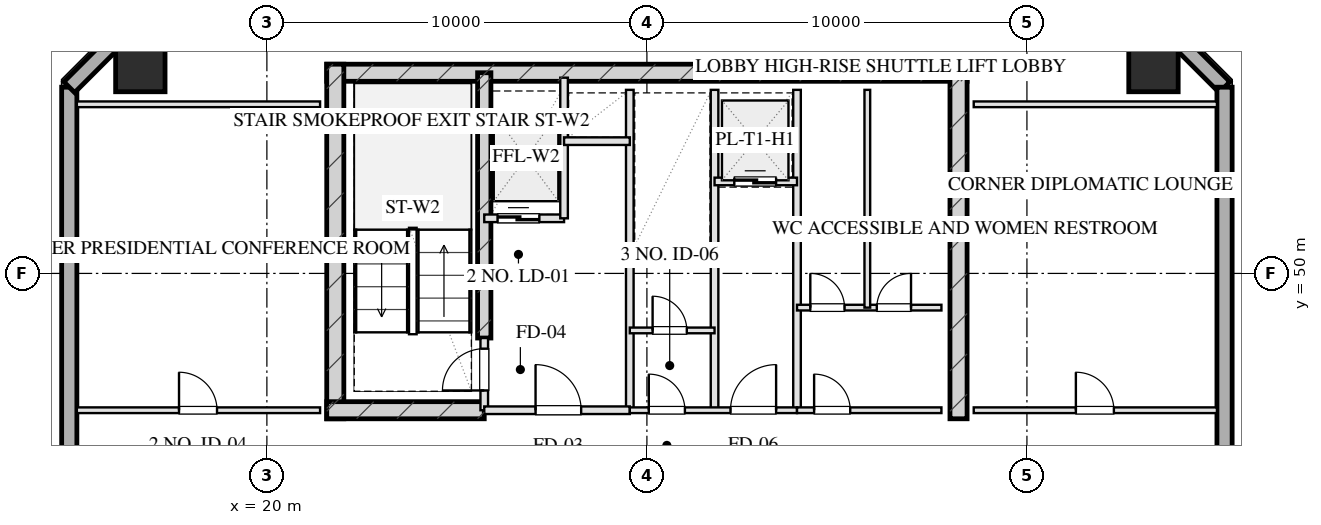
"""IFC4 building model, lengths in metres.
Left out: names, types, materials, properties, quantities, classifications, styles, units other than length and angle.
Written with IfcOpenShell. Run it as: python <this file> out.ifc"""

import sys

from ifc_helpers import new_model, si_unit, direction, frame, frame_2d, origin, origin_2d, place, context, subcontext, project, spatial, rectangle, hollow_rectangle, extrude, element, fill, save


model = new_model("IFC4")
c1 = context("Model", 3, precision=1e-05, world=origin(), true_north=direction((0.0, 1.0)))
c2 = subcontext(c1, "Body", "Model", "MODEL_VIEW")
j1 = project(units=[si_unit("LENGTHUNIT", "METRE"), si_unit("PLANEANGLEUNIT", "RADIAN")], contexts=[c1])
p1 = place(None, origin())
s1 = spatial("IfcSite", under=j1, at=p1, CompositionType="ELEMENT")
p2 = place(p1, origin())
s2 = spatial("IfcBuilding", under=s1, at=p2, CompositionType="ELEMENT")
p3 = place(p2, frame((0.0, 0.0, 234.4)))
s3 = spatial("IfcBuildingStorey", under=s2, at=p3, CompositionType="ELEMENT", Elevation=234.4)
p4 = place(p3, frame((21.575, 55.28, 0.0), z_axis=(0.0, 0.0, 1.0), x_axis=(1.0, 0.0, 0.0)))
e1 = element("IfcWall", 1, at=p4, inside=s3, PredefinedType="SHEAR", context=c2, shape_type="SweptSolid", body=[
    extrude(rectangle(XDim=16.85, YDim=0.45, at=frame_2d((8.425, 0.0))), origin(), (0.0, 0.0, 1.0), 3.2),
])
for number, where, z_axis, x_axis in (
    (2, (21.8, 46.175, 0.0), (0.0, 0.0, 1.0), (0.0, 1.0, 0.0)),
    (3, (38.2, 46.175, 0.0), (0.0, 0.0, 1.0), (0.0, 1.0, 0.0)),
):
    element("IfcWall", number, at=place(p3, frame(where, z_axis=z_axis, x_axis=x_axis)), inside=s3, PredefinedType="SHEAR", context=c2, shape_type="SweptSolid", body=[
        extrude(rectangle(XDim=9.33, YDim=0.45, at=frame_2d((4.665, 0.0))), origin(), (0.0, 0.0, 1.0), 3.2),
    ])
p5 = place(p3, frame((25.72, 48.3, 0.0), z_axis=(0.0, 0.0, 1.0), x_axis=(0.0, 1.0, 0.0)))
e4 = element("IfcWall", 4, at=p5, inside=s3, PredefinedType="SHEAR", context=c2, shape_type="SweptSolid", body=[
    extrude(rectangle(XDim=6.98, YDim=0.35, at=frame_2d((3.49, 0.0))), origin(), (0.0, 0.0, 1.0), 3.2),
])
p6 = place(p3, frame((21.575, 46.4, 0.0), z_axis=(0.0, 0.0, 1.0), x_axis=(1.0, 0.0, 0.0)))
e5 = element("IfcWall", 5, at=p6, inside=s3, PredefinedType="SHEAR", context=c2, shape_type="SweptSolid", body=[
    extrude(rectangle(XDim=4.145, YDim=0.45, at=frame_2d((2.073, 0.0))), origin(), (0.0, 0.0, 1.0), 3.2),
])
for number, where, z_axis, x_axis in (
    (6, (43.33, 55.43, 0.0), (0.0, 0.0, 1.0), (1.0, 0.0, 0.0)),
    (7, (16.67, 55.43, 0.0), (0.0, 0.0, 1.0), (1.0, 0.0, 0.0)),
):
    element("IfcColumn", number, at=place(p3, frame(where, z_axis=z_axis, x_axis=x_axis)), inside=s3, PredefinedType="COLUMN", context=c2, shape_type="SweptSolid", body=[
        extrude(hollow_rectangle(XDim=1.3, YDim=1.3, WallThickness=0.045, at=origin_2d()), origin(), (0.0, 0.0, 1.0), 3.201),
    ])
p7 = place(p3, frame((14.8, 13.1, 0.0), z_axis=(0.0, 0.0, 1.0), x_axis=(0.0, 1.0, 0.0)))
e8 = element("IfcWall", 8, at=p7, inside=s3, PredefinedType="SOLIDWALL", context=c2, shape_type="SweptSolid", body=[
    extrude(rectangle(XDim=41.8, YDim=0.4, at=frame_2d((20.9, 0.0))), origin(), (0.0, 0.0, 1.0), 2.36),
])
p8 = place(p7, frame((13.525, 0.0, 0.75)))
e9 = element("IfcOpeningElement", 9, at=p8, cuts=e8, PredefinedType="OPENING", context=c2, shape_type="SweptSolid", body=[
    extrude(rectangle(XDim=1.95, YDim=1.21, at=frame_2d((0.975, 0.605))), frame((0.0, 0.21, 0.0), z_axis=(0.0, -1.0, 0.0), x_axis=(1.0, 0.0, 0.0)), (0.0, 0.0, 1.0), 0.42),
])
p9 = place(p7, frame((17.325, 0.0, 0.75)))
e10 = element("IfcOpeningElement", 10, at=p9, cuts=e8, PredefinedType="OPENING", context=c2, shape_type="SweptSolid", body=[
    extrude(rectangle(XDim=1.95, YDim=1.21, at=frame_2d((0.975, 0.605))), frame((0.0, 0.21, 0.0), z_axis=(0.0, -1.0, 0.0), x_axis=(1.0, 0.0, 0.0)), (0.0, 0.0, 1.0), 0.42),
])
p10 = place(p7, frame((22.525, 0.0, 0.75)))
e11 = element("IfcOpeningElement", 11, at=p10, cuts=e8, PredefinedType="OPENING", context=c2, shape_type="SweptSolid", body=[
    extrude(rectangle(XDim=1.95, YDim=1.21, at=frame_2d((0.975, 0.605))), frame((0.0, 0.21, 0.0), z_axis=(0.0, -1.0, 0.0), x_axis=(1.0, 0.0, 0.0)), (0.0, 0.0, 1.0), 0.42),
])
p11 = place(p7, frame((26.325, 0.0, 0.75)))
e12 = element("IfcOpeningElement", 12, at=p11, cuts=e8, PredefinedType="OPENING", context=c2, shape_type="SweptSolid", body=[
    extrude(rectangle(XDim=1.95, YDim=1.21, at=frame_2d((0.975, 0.605))), frame((0.0, 0.21, 0.0), z_axis=(0.0, -1.0, 0.0), x_axis=(1.0, 0.0, 0.0)), (0.0, 0.0, 1.0), 0.42),
])
for number, where, z_axis, x_axis in (
    (13, (14.8, 54.9, 0.0), (0.0, 0.0, 1.0), (0.707, 0.707, 0.0)),
    (14, (42.8, 57.3, 0.0), (0.0, 0.0, 1.0), (0.707, -0.707, 0.0)),
):
    element("IfcWall", number, at=place(p3, frame(where, z_axis=z_axis, x_axis=x_axis)), inside=s3, PredefinedType="SOLIDWALL", context=c2, shape_type="SweptSolid", body=[
        extrude(rectangle(XDim=3.394, YDim=0.4, at=frame_2d((1.697, 0.0))), origin(), (0.0, 0.0, 1.0), 2.36),
    ])
p12 = place(p3, frame((45.2, 54.9, 0.0), z_axis=(0.0, 0.0, 1.0), x_axis=(0.0, -1.0, 0.0)))
e15 = element("IfcWall", 15, at=p12, inside=s3, PredefinedType="SOLIDWALL", context=c2, shape_type="SweptSolid", body=[
    extrude(rectangle(XDim=41.8, YDim=0.4, at=frame_2d((20.9, 0.0))), origin(), (0.0, 0.0, 1.0), 2.36),
])
p13 = place(p12, frame((26.325, 0.0, 0.75)))
e16 = element("IfcOpeningElement", 16, at=p13, cuts=e15, PredefinedType="OPENING", context=c2, shape_type="SweptSolid", body=[
    extrude(rectangle(XDim=1.95, YDim=1.21, at=frame_2d((0.975, 0.605))), frame((0.0, 0.21, 0.0), z_axis=(0.0, -1.0, 0.0), x_axis=(1.0, 0.0, 0.0)), (0.0, 0.0, 1.0), 0.42),
])
p14 = place(p12, frame((22.525, 0.0, 0.75)))
e17 = element("IfcOpeningElement", 17, at=p14, cuts=e15, PredefinedType="OPENING", context=c2, shape_type="SweptSolid", body=[
    extrude(rectangle(XDim=1.95, YDim=1.21, at=frame_2d((0.975, 0.605))), frame((0.0, 0.21, 0.0), z_axis=(0.0, -1.0, 0.0), x_axis=(1.0, 0.0, 0.0)), (0.0, 0.0, 1.0), 0.42),
])
p15 = place(p12, frame((17.325, 0.0, 0.75)))
e18 = element("IfcOpeningElement", 18, at=p15, cuts=e15, PredefinedType="OPENING", context=c2, shape_type="SweptSolid", body=[
    extrude(rectangle(XDim=1.95, YDim=1.21, at=frame_2d((0.975, 0.605))), frame((0.0, 0.21, 0.0), z_axis=(0.0, -1.0, 0.0), x_axis=(1.0, 0.0, 0.0)), (0.0, 0.0, 1.0), 0.42),
])
p16 = place(p12, frame((13.525, 0.0, 0.75)))
e19 = element("IfcOpeningElement", 19, at=p16, cuts=e15, PredefinedType="OPENING", context=c2, shape_type="SweptSolid", body=[
    extrude(rectangle(XDim=1.95, YDim=1.21, at=frame_2d((0.975, 0.605))), frame((0.0, 0.21, 0.0), z_axis=(0.0, -1.0, 0.0), x_axis=(1.0, 0.0, 0.0)), (0.0, 0.0, 1.0), 0.42),
])
p17 = place(p3, frame((25.72, 46.4, 0.0), z_axis=(0.0, 0.0, 1.0), x_axis=(0.0, 1.0, 0.0)))
e20 = element("IfcWall", 20, at=p17, inside=s3, PredefinedType="PARTITIONING", context=c2, shape_type="SweptSolid", body=[
    extrude(rectangle(XDim=1.9, YDim=0.2, at=frame_2d((0.95, 0.0))), origin(), (0.0, 0.0, 1.0), 2.925),
])
p18 = place(p17, frame((0.52, 0.0, 0.0)))
e21 = element("IfcOpeningElement", 21, at=p18, cuts=e20, PredefinedType="OPENING", context=c2, shape_type="SweptSolid", body=[
    extrude(rectangle(XDim=1.1, YDim=2.05, at=frame_2d((0.55, 1.025))), frame((0.0, 0.11, 0.0), z_axis=(0.0, -1.0, 0.0), x_axis=(1.0, 0.0, 0.0)), (0.0, 0.0, 1.0), 0.22),
])
p19 = place(p3, frame((29.55, 46.4, 0.0), z_axis=(0.0, 0.0, 1.0), x_axis=(0.0, 1.0, 0.0)))
e22 = element("IfcWall", 22, at=p19, inside=s3, PredefinedType="PARTITIONING", context=c2, shape_type="SweptSolid", body=[
    extrude(rectangle(XDim=8.43, YDim=0.2, at=frame_2d((4.215, 0.0))), origin(), (0.0, 0.0, 1.0), 2.925),
])
p20 = place(p3, frame((25.72, 46.4, 0.0), z_axis=(0.0, 0.0, 1.0), x_axis=(1.0, 0.0, 0.0)))
e23 = element("IfcWall", 23, at=p20, inside=s3, PredefinedType="PARTITIONING", context=c2, shape_type="SweptSolid", body=[
    extrude(rectangle(XDim=3.83, YDim=0.2, at=frame_2d((1.915, 0.0))), origin(), (0.0, 0.0, 1.0), 2.925),
])
p21 = place(p20, frame((1.35, 0.0, 0.0)))
e24 = element("IfcOpeningElement", 24, at=p21, cuts=e23, PredefinedType="OPENING", context=c2, shape_type="SweptSolid", body=[
    extrude(rectangle(XDim=1.2, YDim=2.05, at=frame_2d((0.6, 1.025))), frame((0.0, 0.11, 0.0), z_axis=(0.0, -1.0, 0.0), x_axis=(1.0, 0.0, 0.0)), (0.0, 0.0, 1.0), 0.22),
])
p22 = place(p3, frame((25.72, 51.45, 0.0), z_axis=(0.0, 0.0, 1.0), x_axis=(1.0, 0.0, 0.0)))
e25 = element("IfcWall", 25, at=p22, inside=s3, PredefinedType="PARTITIONING", context=c2, shape_type="SweptSolid", body=[
    extrude(rectangle(XDim=2.1, YDim=0.2, at=frame_2d((1.05, 0.0))), origin(), (0.0, 0.0, 1.0), 2.925),
])
p23 = place(p22, frame((0.35, 0.0, 0.0)))
e26 = element("IfcOpeningElement", 26, at=p23, cuts=e25, PredefinedType="OPENING", context=c2, shape_type="SweptSolid", body=[
    extrude(rectangle(XDim=1.1, YDim=2.05, at=frame_2d((0.55, 1.025))), frame((0.0, 0.11, 0.0), z_axis=(0.0, -1.0, 0.0), x_axis=(1.0, 0.0, 0.0)), (0.0, 0.0, 1.0), 0.22),
])
p24 = place(p3, frame((27.82, 51.45, 0.0), z_axis=(0.0, 0.0, 1.0), x_axis=(0.0, 1.0, 0.0)))
e27 = element("IfcWall", 27, at=p24, inside=s3, PredefinedType="PARTITIONING", context=c2, shape_type="SweptSolid", body=[
    extrude(rectangle(XDim=3.7, YDim=0.2, at=frame_2d((1.85, 0.0))), origin(), (0.0, 0.0, 1.0), 2.925),
])
p25 = place(p3, frame((27.82, 53.48, 0.0), z_axis=(0.0, 0.0, 1.0), x_axis=(1.0, 0.0, 0.0)))
e28 = element("IfcWall", 28, at=p25, inside=s3, PredefinedType="PARTITIONING", context=c2, shape_type="SweptSolid", body=[
    extrude(rectangle(XDim=1.73, YDim=0.2, at=frame_2d((0.865, 0.0))), origin(), (0.0, 0.0, 1.0), 2.925),
])
for number, where, z_axis, x_axis in (
    (29, (33.95, 46.4, 0.0), (0.0, 0.0, 1.0), (0.0, 1.0, 0.0)),
    (30, (31.78, 46.4, 0.0), (0.0, 0.0, 1.0), (0.0, 1.0, 0.0)),
):
    element("IfcWall", number, at=place(p3, frame(where, z_axis=z_axis, x_axis=x_axis)), inside=s3, PredefinedType="PARTITIONING", context=c2, shape_type="SweptSolid", body=[
        extrude(rectangle(XDim=8.43, YDim=0.2, at=frame_2d((4.215, 0.0))), origin(), (0.0, 0.0, 1.0), 2.925),
    ])
p26 = place(p3, frame((29.55, 46.4, 0.0), z_axis=(0.0, 0.0, 1.0), x_axis=(1.0, 0.0, 0.0)))
e31 = element("IfcWall", 31, at=p26, inside=s3, PredefinedType="PARTITIONING", context=c2, shape_type="SweptSolid", body=[
    extrude(rectangle(XDim=4.4, YDim=0.15, at=frame_2d((2.2, 0.0))), origin(), (0.0, 0.0, 1.0), 2.925),
])
p27 = place(p26, frame((0.5, 0.0, 0.0)))
e32 = element("IfcOpeningElement", 32, at=p27, cuts=e31, PredefinedType="OPENING", context=c2, shape_type="SweptSolid", body=[
    extrude(rectangle(XDim=0.95, YDim=2.05, at=frame_2d((0.475, 1.025))), frame((0.0, 0.085, 0.0), z_axis=(0.0, -1.0, 0.0), x_axis=(1.0, 0.0, 0.0)), (0.0, 0.0, 1.0), 0.17),
])
p28 = place(p26, frame((2.65, 0.0, 0.0)))
e33 = element("IfcOpeningElement", 33, at=p28, cuts=e31, PredefinedType="OPENING", context=c2, shape_type="SweptSolid", body=[
    extrude(rectangle(XDim=1.2, YDim=2.05, at=frame_2d((0.6, 1.025))), frame((0.0, 0.085, 0.0), z_axis=(0.0, -1.0, 0.0), x_axis=(1.0, 0.0, 0.0)), (0.0, 0.0, 1.0), 0.17),
])
p29 = place(p3, frame((29.55, 50.6, 0.0), z_axis=(0.0, 0.0, 1.0), x_axis=(1.0, 0.0, 0.0)))
e34 = element("IfcWall", 34, at=p29, inside=s3, PredefinedType="PARTITIONING", context=c2, shape_type="SweptSolid", body=[
    extrude(rectangle(XDim=2.23, YDim=0.15, at=frame_2d((1.115, 0.0))), origin(), (0.0, 0.0, 1.0), 2.925),
])
p30 = place(p3, frame((29.55, 48.5, 0.0), z_axis=(0.0, 0.0, 1.0), x_axis=(1.0, 0.0, 0.0)))
e35 = element("IfcWall", 35, at=p30, inside=s3, PredefinedType="PARTITIONING", context=c2, shape_type="SweptSolid", body=[
    extrude(rectangle(XDim=2.23, YDim=0.15, at=frame_2d((1.115, 0.0))), origin(), (0.0, 0.0, 1.0), 2.925),
])
p31 = place(p30, frame((0.6, 0.0, 0.0)))
e36 = element("IfcOpeningElement", 36, at=p31, cuts=e35, PredefinedType="OPENING", context=c2, shape_type="SweptSolid", body=[
    extrude(rectangle(XDim=0.9, YDim=2.05, at=frame_2d((0.45, 1.025))), frame((0.0, 0.085, 0.0), z_axis=(0.0, -1.0, 0.0), x_axis=(1.0, 0.0, 0.0)), (0.0, 0.0, 1.0), 0.17),
])
p32 = place(p3, frame((31.78, 52.42, 0.0), z_axis=(0.0, 0.0, 1.0), x_axis=(1.0, 0.0, 0.0)))
e37 = element("IfcWall", 37, at=p32, inside=s3, PredefinedType="PARTITIONING", context=c2, shape_type="SweptSolid", body=[
    extrude(rectangle(XDim=2.17, YDim=0.2, at=frame_2d((1.085, 0.0))), origin(), (0.0, 0.0, 1.0), 2.925),
])
p33 = place(p32, frame((0.52, 0.0, 0.0)))
e38 = element("IfcOpeningElement", 38, at=p33, cuts=e37, PredefinedType="OPENING", context=c2, shape_type="SweptSolid", body=[
    extrude(rectangle(XDim=1.1, YDim=2.05, at=frame_2d((0.55, 1.025))), frame((0.0, 0.11, 0.0), z_axis=(0.0, -1.0, 0.0), x_axis=(1.0, 0.0, 0.0)), (0.0, 0.0, 1.0), 0.22),
])
p34 = place(p3, frame((33.95, 46.4, 0.0), z_axis=(0.0, 0.0, 1.0), x_axis=(1.0, 0.0, 0.0)))
e39 = element("IfcWall", 39, at=p34, inside=s3, PredefinedType="PARTITIONING", context=c2, shape_type="SweptSolid", body=[
    extrude(rectangle(XDim=3.8, YDim=0.15, at=frame_2d((1.9, 0.0))), origin(), (0.0, 0.0, 1.0), 2.925),
])
p35 = place(p34, frame((0.45, 0.0, 0.0)))
e40 = element("IfcOpeningElement", 40, at=p35, cuts=e39, PredefinedType="OPENING", context=c2, shape_type="SweptSolid", body=[
    extrude(rectangle(XDim=0.95, YDim=2.05, at=frame_2d((0.475, 1.025))), frame((0.0, 0.085, 0.0), z_axis=(0.0, -1.0, 0.0), x_axis=(1.0, 0.0, 0.0)), (0.0, 0.0, 1.0), 0.17),
])
p36 = place(p3, frame((33.95, 49.1, 0.0), z_axis=(0.0, 0.0, 1.0), x_axis=(1.0, 0.0, 0.0)))
e41 = element("IfcWall", 41, at=p36, inside=s3, PredefinedType="PARTITIONING", context=c2, shape_type="SweptSolid", body=[
    extrude(rectangle(XDim=3.8, YDim=0.15, at=frame_2d((1.9, 0.0))), origin(), (0.0, 0.0, 1.0), 2.925),
])
p37 = place(p36, frame((0.35, 0.0, 0.0)))
e42 = element("IfcOpeningElement", 42, at=p37, cuts=e41, PredefinedType="OPENING", context=c2, shape_type="SweptSolid", body=[
    extrude(rectangle(XDim=0.9, YDim=2.05, at=frame_2d((0.45, 1.025))), frame((0.0, 0.085, 0.0), z_axis=(0.0, -1.0, 0.0), x_axis=(1.0, 0.0, 0.0)), (0.0, 0.0, 1.0), 0.17),
])
p38 = place(p36, frame((2.1, 0.0, 0.0)))
e43 = element("IfcOpeningElement", 43, at=p38, cuts=e41, PredefinedType="OPENING", context=c2, shape_type="SweptSolid", body=[
    extrude(rectangle(XDim=0.9, YDim=2.05, at=frame_2d((0.45, 1.025))), frame((0.0, 0.085, 0.0), z_axis=(0.0, -1.0, 0.0), x_axis=(1.0, 0.0, 0.0)), (0.0, 0.0, 1.0), 0.17),
])
p39 = place(p3, frame((35.8, 49.1, 0.0), z_axis=(0.0, 0.0, 1.0), x_axis=(0.0, 1.0, 0.0)))
e44 = element("IfcWall", 44, at=p39, inside=s3, PredefinedType="PARTITIONING", context=c2, shape_type="SweptSolid", body=[
    extrude(rectangle(XDim=5.73, YDim=0.15, at=frame_2d((2.865, 0.0))), origin(), (0.0, 0.0, 1.0), 2.925),
])
p40 = place(p3, frame((15.0, 54.45, 0.0), z_axis=(0.0, 0.0, 1.0), x_axis=(1.0, 0.0, 0.0)))
e45 = element("IfcWall", 45, at=p40, inside=s3, PredefinedType="PARTITIONING", context=c2, shape_type="SweptSolid", body=[
    extrude(rectangle(XDim=6.4, YDim=0.15, at=frame_2d((3.2, 0.0))), origin(), (0.0, 0.0, 1.0), 2.925),
])
p41 = place(p3, frame((15.0, 46.4, 0.0), z_axis=(0.0, 0.0, 1.0), x_axis=(1.0, 0.0, 0.0)))
e46 = element("IfcWall", 46, at=p41, inside=s3, PredefinedType="PARTITIONING", context=c2, shape_type="SweptSolid", body=[
    extrude(rectangle(XDim=6.4, YDim=0.15, at=frame_2d((3.2, 0.0))), origin(), (0.0, 0.0, 1.0), 2.925),
])
p42 = place(p41, frame((2.688, 0.0, 0.0)))
e47 = element("IfcOpeningElement", 47, at=p42, cuts=e46, PredefinedType="OPENING", context=c2, shape_type="SweptSolid", body=[
    extrude(rectangle(XDim=1.0, YDim=2.05, at=frame_2d((0.5, 1.025))), frame((0.0, 0.085, 0.0), z_axis=(0.0, -1.0, 0.0), x_axis=(1.0, 0.0, 0.0)), (0.0, 0.0, 1.0), 0.17),
])
p43 = place(p3, frame((38.6, 54.45, 0.0), z_axis=(0.0, 0.0, 1.0), x_axis=(1.0, 0.0, 0.0)))
e48 = element("IfcWall", 48, at=p43, inside=s3, PredefinedType="PARTITIONING", context=c2, shape_type="SweptSolid", body=[
    extrude(rectangle(XDim=6.4, YDim=0.15, at=frame_2d((3.2, 0.0))), origin(), (0.0, 0.0, 1.0), 2.925),
])
p44 = place(p3, frame((38.6, 46.4, 0.0), z_axis=(0.0, 0.0, 1.0), x_axis=(1.0, 0.0, 0.0)))
e49 = element("IfcWall", 49, at=p44, inside=s3, PredefinedType="PARTITIONING", context=c2, shape_type="SweptSolid", body=[
    extrude(rectangle(XDim=6.4, YDim=0.15, at=frame_2d((3.2, 0.0))), origin(), (0.0, 0.0, 1.0), 2.925),
])
p45 = place(p44, frame((2.688, 0.0, 0.0)))
e50 = element("IfcOpeningElement", 50, at=p45, cuts=e49, PredefinedType="OPENING", context=c2, shape_type="SweptSolid", body=[
    extrude(rectangle(XDim=1.0, YDim=2.05, at=frame_2d((0.5, 1.025))), frame((0.0, 0.085, 0.0), z_axis=(0.0, -1.0, 0.0), x_axis=(1.0, 0.0, 0.0)), (0.0, 0.0, 1.0), 0.17),
])
p46 = place(p18, origin())
e51 = element("IfcDoor", 51, at=p46, inside=s3, OperationType="SINGLE_SWING_LEFT", PredefinedType="DOOR", context=c2, shape_type="SweptSolid", body=[
    extrude(rectangle(XDim=1.1, YDim=2.05, at=frame_2d((0.55, 1.025))), frame((0.0, 0.025, 0.0), z_axis=(0.0, -1.0, 0.0), x_axis=(1.0, 0.0, 0.0)), (0.0, 0.0, 1.0), 0.05),
])
fill(e21, e51)
p47 = place(p21, origin())
e52 = element("IfcDoor", 52, at=p47, inside=s3, OperationType="SINGLE_SWING_LEFT", PredefinedType="DOOR", context=c2, shape_type="SweptSolid", body=[
    extrude(rectangle(XDim=1.2, YDim=2.05, at=frame_2d((0.6, 1.025))), frame((0.0, 0.025, 0.0), z_axis=(0.0, -1.0, 0.0), x_axis=(1.0, 0.0, 0.0)), (0.0, 0.0, 1.0), 0.05),
])
fill(e24, e52)
p48 = place(p23, origin())
e53 = element("IfcDoor", 53, at=p48, inside=s3, OperationType="DOUBLE_DOOR_SLIDING", PredefinedType="DOOR", context=c2, shape_type="SweptSolid", body=[
    extrude(rectangle(XDim=1.1, YDim=2.05, at=frame_2d((0.55, 1.025))), frame((0.0, 0.025, 0.0), z_axis=(0.0, -1.0, 0.0), x_axis=(1.0, 0.0, 0.0)), (0.0, 0.0, 1.0), 0.05),
])
fill(e26, e53)
p49 = place(p27, origin())
e54 = element("IfcDoor", 54, at=p49, inside=s3, OperationType="SINGLE_SWING_LEFT", PredefinedType="DOOR", context=c2, shape_type="SweptSolid", body=[
    extrude(rectangle(XDim=0.95, YDim=2.05, at=frame_2d((0.475, 1.025))), frame((0.0, 0.025, 0.0), z_axis=(0.0, -1.0, 0.0), x_axis=(1.0, 0.0, 0.0)), (0.0, 0.0, 1.0), 0.05),
])
fill(e32, e54)
p50 = place(p28, origin())
e55 = element("IfcDoor", 55, at=p50, inside=s3, OperationType="SINGLE_SWING_RIGHT", PredefinedType="DOOR", context=c2, shape_type="SweptSolid", body=[
    extrude(rectangle(XDim=1.2, YDim=2.05, at=frame_2d((0.6, 1.025))), frame((0.0, 0.025, 0.0), z_axis=(0.0, -1.0, 0.0), x_axis=(1.0, 0.0, 0.0)), (0.0, 0.0, 1.0), 0.05),
])
fill(e33, e55)
p51 = place(p31, origin())
e56 = element("IfcDoor", 56, at=p51, inside=s3, OperationType="SINGLE_SWING_LEFT", PredefinedType="DOOR", context=c2, shape_type="SweptSolid", body=[
    extrude(rectangle(XDim=0.9, YDim=2.05, at=frame_2d((0.45, 1.025))), frame((0.0, 0.025, 0.0), z_axis=(0.0, -1.0, 0.0), x_axis=(1.0, 0.0, 0.0)), (0.0, 0.0, 1.0), 0.05),
])
fill(e36, e56)
p52 = place(p33, origin())
e57 = element("IfcDoor", 57, at=p52, inside=s3, OperationType="DOUBLE_DOOR_SLIDING", PredefinedType="DOOR", context=c2, shape_type="SweptSolid", body=[
    extrude(rectangle(XDim=1.1, YDim=2.05, at=frame_2d((0.55, 1.025))), frame((0.0, 0.025, 0.0), z_axis=(0.0, -1.0, 0.0), x_axis=(1.0, 0.0, 0.0)), (0.0, 0.0, 1.0), 0.05),
])
fill(e38, e57)
p53 = place(p35, origin())
e58 = element("IfcDoor", 58, at=p53, inside=s3, OperationType="SINGLE_SWING_LEFT", PredefinedType="DOOR", context=c2, shape_type="SweptSolid", body=[
    extrude(rectangle(XDim=0.95, YDim=2.05, at=frame_2d((0.475, 1.025))), frame((0.0, 0.025, 0.0), z_axis=(0.0, -1.0, 0.0), x_axis=(1.0, 0.0, 0.0)), (0.0, 0.0, 1.0), 0.05),
])
fill(e40, e58)
p54 = place(p37, origin())
e59 = element("IfcDoor", 59, at=p54, inside=s3, OperationType="SINGLE_SWING_LEFT", PredefinedType="DOOR", context=c2, shape_type="SweptSolid", body=[
    extrude(rectangle(XDim=0.9, YDim=2.05, at=frame_2d((0.45, 1.025))), frame((0.0, 0.025, 0.0), z_axis=(0.0, -1.0, 0.0), x_axis=(1.0, 0.0, 0.0)), (0.0, 0.0, 1.0), 0.05),
])
fill(e42, e59)
p55 = place(p38, origin())
e60 = element("IfcDoor", 60, at=p55, inside=s3, OperationType="SINGLE_SWING_RIGHT", PredefinedType="DOOR", context=c2, shape_type="SweptSolid", body=[
    extrude(rectangle(XDim=0.9, YDim=2.05, at=frame_2d((0.45, 1.025))), frame((0.0, 0.025, 0.0), z_axis=(0.0, -1.0, 0.0), x_axis=(1.0, 0.0, 0.0)), (0.0, 0.0, 1.0), 0.05),
])
fill(e43, e60)
p56 = place(p42, origin())
e61 = element("IfcDoor", 61, at=p56, inside=s3, OperationType="SINGLE_SWING_LEFT", PredefinedType="DOOR", context=c2, shape_type="SweptSolid", body=[
    extrude(rectangle(XDim=1.0, YDim=2.05, at=frame_2d((0.5, 1.025))), frame((0.0, 0.025, 0.0), z_axis=(0.0, -1.0, 0.0), x_axis=(1.0, 0.0, 0.0)), (0.0, 0.0, 1.0), 0.05),
])
fill(e47, e61)
p57 = place(p45, origin())
e62 = element("IfcDoor", 62, at=p57, inside=s3, OperationType="SINGLE_SWING_LEFT", PredefinedType="DOOR", context=c2, shape_type="SweptSolid", body=[
    extrude(rectangle(XDim=1.0, YDim=2.05, at=frame_2d((0.5, 1.025))), frame((0.0, 0.025, 0.0), z_axis=(0.0, -1.0, 0.0), x_axis=(1.0, 0.0, 0.0)), (0.0, 0.0, 1.0), 0.05),
])
fill(e50, e62)
save(model, sys.argv[1])
